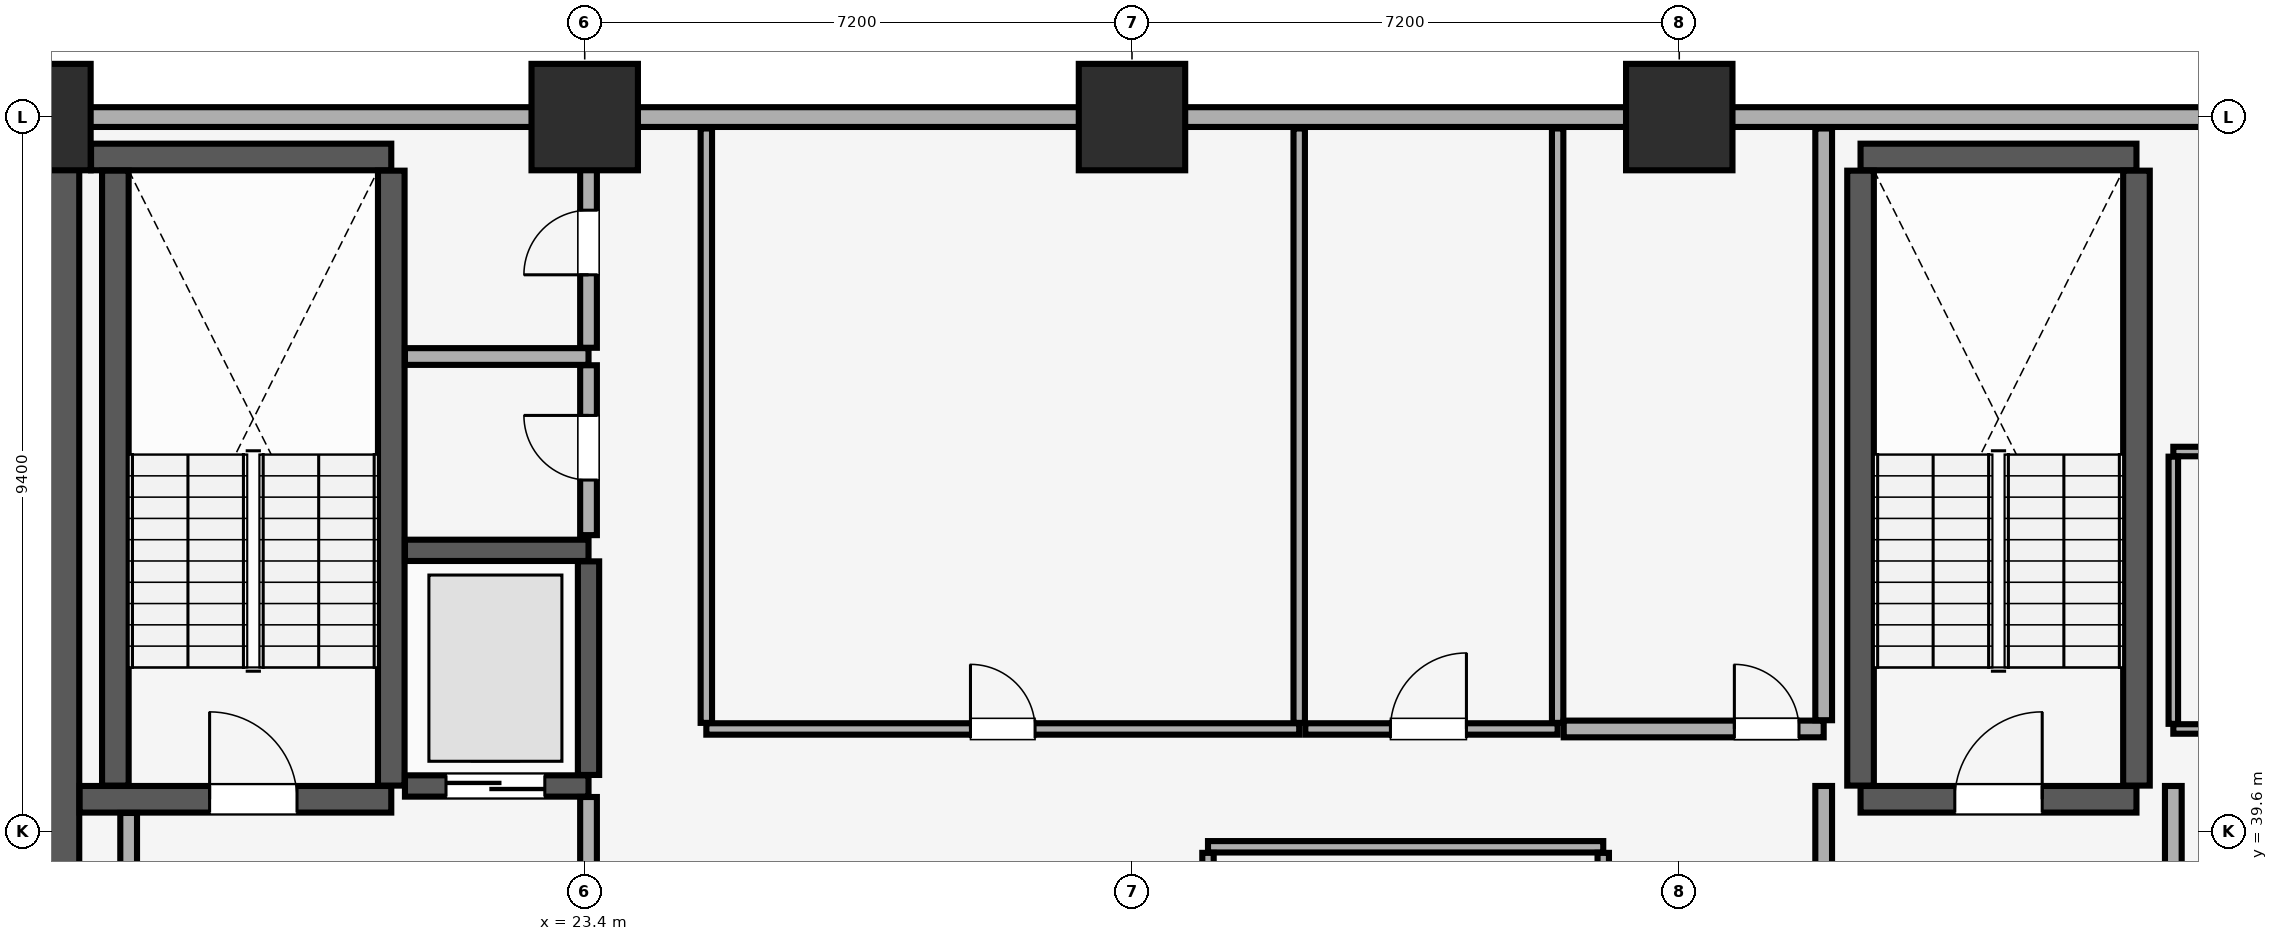
"""IFC4 building model, lengths in metres.
Left out: names, types, materials, properties, quantities, classifications, styles, units other than length and angle.
Written with IfcOpenShell. Run it as: python <this file> out.ifc"""

import sys

from ifc_helpers import new_model, si_unit, direction, frame, frame_2d, origin, origin_2d, place, context, subcontext, project, spatial, rectangle, extrude, element, fill, save


model = new_model("IFC4")
c1 = context("Model", 3, precision=1e-05, world=origin(), true_north=direction((0.0, 1.0)))
c2 = subcontext(c1, "Body", "Model", "MODEL_VIEW")
j1 = project(units=[si_unit("LENGTHUNIT", "METRE"), si_unit("PLANEANGLEUNIT", "RADIAN")], contexts=[c1])
p1 = place(None, origin())
s1 = spatial("IfcSite", under=j1, at=p1, CompositionType="ELEMENT")
p2 = place(p1, origin())
s2 = spatial("IfcBuilding", under=s1, at=p2, CompositionType="ELEMENT")
p3 = place(p2, frame((0.0, 0.0, 76.4)))
s3 = spatial("IfcBuildingStorey", under=s2, at=p3, CompositionType="ELEMENT", Elevation=76.4)
for number, where, z_axis, x_axis in (
    (1, (16.2, 49.0, 0.0), (0.0, 0.0, 1.0), (1.0, 0.0, 0.0)),
    (2, (23.4, 49.0, 0.0), (0.0, 0.0, 1.0), (1.0, 0.0, 0.0)),
    (3, (30.6, 49.0, 0.0), (0.0, 0.0, 1.0), (1.0, 0.0, 0.0)),
    (4, (37.8, 49.0, 0.0), (0.0, 0.0, 1.0), (1.0, 0.0, 0.0)),
):
    element("IfcColumn", number, at=place(p3, frame(where, z_axis=z_axis, x_axis=x_axis)), inside=s3, PredefinedType="COLUMN", context=c2, shape_type="SweptSolid", body=[
        extrude(rectangle(XDim=1.4, YDim=1.4, at=origin_2d()), origin(), (0.0, 0.0, 1.0), 3.4),
    ])
p4 = place(p3, frame((79.8, 49.0, 0.0), z_axis=(0.0, 0.0, 1.0), x_axis=(-1.0, 0.0, 0.0)))
e5 = element("IfcWall", 5, at=p4, inside=s3, PredefinedType="SOLIDWALL", context=c2, shape_type="SweptSolid", body=[
    extrude(rectangle(XDim=75.6, YDim=0.26, at=frame_2d((37.8, 0.0))), origin(), (0.0, 0.0, 1.0), 2.45),
])
p5 = place(p3, frame((16.2, 29.4, 0.0), z_axis=(0.0, 0.0, 1.0), x_axis=(0.0, 1.0, 0.0)))
e6 = element("IfcWall", 6, at=p5, inside=s3, PredefinedType="SHEAR", context=c2, shape_type="SweptSolid", body=[
    extrude(rectangle(XDim=19.2, YDim=1.1, at=frame_2d((9.6, 0.0))), origin(), (0.0, 0.0, 1.0), 3.4),
])
p6 = place(p3, frame((16.755, 40.025, 0.0), z_axis=(0.0, 0.0, 1.0), x_axis=(1.0, 0.0, 0.0)))
e7 = element("IfcWall", 7, at=p6, inside=s3, PredefinedType="SHEAR", context=c2, shape_type="SweptSolid", body=[
    extrude(rectangle(XDim=4.1, YDim=0.35, at=frame_2d((2.05, 0.0))), origin(), (0.0, 0.0, 1.0), 3.4),
])
p7 = place(p6, frame((1.71, 0.0, 0.0)))
e8 = element("IfcOpeningElement", 8, at=p7, cuts=e7, PredefinedType="OPENING", context=c2, shape_type="SweptSolid", body=[
    extrude(rectangle(XDim=1.15, YDim=2.15, at=frame_2d((0.575, 1.075))), frame((0.0, 0.185, 0.0), z_axis=(0.0, -1.0, 0.0), x_axis=(1.0, 0.0, 0.0)), (0.0, 0.0, 1.0), 0.37),
])
p8 = place(p3, frame((16.905, 48.475, 0.0), z_axis=(0.0, 0.0, 1.0), x_axis=(1.0, 0.0, 0.0)))
e9 = element("IfcWall", 9, at=p8, inside=s3, PredefinedType="SHEAR", context=c2, shape_type="SweptSolid", body=[
    extrude(rectangle(XDim=3.95, YDim=0.35, at=frame_2d((1.975, 0.0))), origin(), (0.0, 0.0, 1.0), 3.4),
])
for number, where, z_axis, x_axis in (
    (10, (17.225, 40.205, 0.0), (0.0, 0.0, 1.0), (0.0, 1.0, 0.0)),
    (11, (20.855, 40.205, 0.0), (0.0, 0.0, 1.0), (0.0, 1.0, 0.0)),
):
    element("IfcWall", number, at=place(p3, frame(where, z_axis=z_axis, x_axis=x_axis)), inside=s3, PredefinedType="SHEAR", context=c2, shape_type="SweptSolid", body=[
        extrude(rectangle(XDim=8.09, YDim=0.35, at=frame_2d((4.045, 0.0))), origin(), (0.0, 0.0, 1.0), 3.4),
    ])
p9 = place(p3, frame((40.185, 40.025, 0.0), z_axis=(0.0, 0.0, 1.0), x_axis=(1.0, 0.0, 0.0)))
e12 = element("IfcWall", 12, at=p9, inside=s3, PredefinedType="SHEAR", context=c2, shape_type="SweptSolid", body=[
    extrude(rectangle(XDim=3.63, YDim=0.35, at=frame_2d((1.815, 0.0))), origin(), (0.0, 0.0, 1.0), 3.4),
])
p10 = place(p9, frame((1.24, 0.0, 0.0)))
e13 = element("IfcOpeningElement", 13, at=p10, cuts=e12, PredefinedType="OPENING", context=c2, shape_type="SweptSolid", body=[
    extrude(rectangle(XDim=1.15, YDim=2.15, at=frame_2d((0.575, 1.075))), frame((0.0, 0.185, 0.0), z_axis=(0.0, -1.0, 0.0), x_axis=(1.0, 0.0, 0.0)), (0.0, 0.0, 1.0), 0.37),
])
p11 = place(p3, frame((40.185, 48.475, 0.0), z_axis=(0.0, 0.0, 1.0), x_axis=(1.0, 0.0, 0.0)))
e14 = element("IfcWall", 14, at=p11, inside=s3, PredefinedType="SHEAR", context=c2, shape_type="SweptSolid", body=[
    extrude(rectangle(XDim=3.63, YDim=0.35, at=frame_2d((1.815, 0.0))), origin(), (0.0, 0.0, 1.0), 3.4),
])
for number, where, z_axis, x_axis in (
    (15, (40.185, 40.205, 0.0), (0.0, 0.0, 1.0), (0.0, 1.0, 0.0)),
    (16, (43.815, 40.205, 0.0), (0.0, 0.0, 1.0), (0.0, 1.0, 0.0)),
):
    element("IfcWall", number, at=place(p3, frame(where, z_axis=z_axis, x_axis=x_axis)), inside=s3, PredefinedType="SHEAR", context=c2, shape_type="SweptSolid", body=[
        extrude(rectangle(XDim=8.09, YDim=0.35, at=frame_2d((4.045, 0.0))), origin(), (0.0, 0.0, 1.0), 3.4),
    ])
p12 = place(p3, frame((21.035, 40.2, 0.0), z_axis=(0.0, 0.0, 1.0), x_axis=(1.0, 0.0, 0.0)))
e17 = element("IfcWall", 17, at=p12, inside=s3, PredefinedType="SHEAR", context=c2, shape_type="SweptSolid", body=[
    extrude(rectangle(XDim=2.415, YDim=0.28, at=frame_2d((1.208, 0.0))), origin(), (0.0, 0.0, 1.0), 3.4),
])
p13 = place(p12, frame((0.54, 0.0, 0.0)))
e18 = element("IfcOpeningElement", 18, at=p13, cuts=e17, PredefinedType="OPENING", context=c2, shape_type="SweptSolid", body=[
    extrude(rectangle(XDim=1.3, YDim=2.3, at=frame_2d((0.65, 1.15))), frame((0.0, 0.15, 0.0), z_axis=(0.0, -1.0, 0.0), x_axis=(1.0, 0.0, 0.0)), (0.0, 0.0, 1.0), 0.3),
])
p14 = place(p3, frame((21.035, 43.3, 0.0), z_axis=(0.0, 0.0, 1.0), x_axis=(1.0, 0.0, 0.0)))
e19 = element("IfcWall", 19, at=p14, inside=s3, PredefinedType="SHEAR", context=c2, shape_type="SweptSolid", body=[
    extrude(rectangle(XDim=2.415, YDim=0.28, at=frame_2d((1.208, 0.0))), origin(), (0.0, 0.0, 1.0), 3.4),
])
p15 = place(p3, frame((23.45, 40.345, 0.0), z_axis=(0.0, 0.0, 1.0), x_axis=(0.0, 1.0, 0.0)))
e20 = element("IfcWall", 20, at=p15, inside=s3, PredefinedType="SHEAR", context=c2, shape_type="SweptSolid", body=[
    extrude(rectangle(XDim=2.81, YDim=0.28, at=frame_2d((1.405, 0.0))), origin(), (0.0, 0.0, 1.0), 3.4),
])
p16 = place(p3, frame((17.4, 34.415, 0.0), z_axis=(0.0, 0.0, 1.0), x_axis=(0.0, 1.0, 0.0)))
e21 = element("IfcWall", 21, at=p16, inside=s3, PredefinedType="PARTITIONING", context=c2, shape_type="SweptSolid", body=[
    extrude(rectangle(XDim=5.43, YDim=0.22, at=frame_2d((2.715, 0.0))), origin(), (0.0, 0.0, 1.0), 3.4),
])
p17 = place(p3, frame((23.45, 34.415, 0.0), z_axis=(0.0, 0.0, 1.0), x_axis=(0.0, 1.0, 0.0)))
e22 = element("IfcWall", 22, at=p17, inside=s3, PredefinedType="PARTITIONING", context=c2, shape_type="SweptSolid", body=[
    extrude(rectangle(XDim=5.64, YDim=0.22, at=frame_2d((2.82, 0.0))), origin(), (0.0, 0.0, 1.0), 3.4),
])
for number, where, z_axis, x_axis in (
    (23, (39.7, 34.415, 0.0), (0.0, 0.0, 1.0), (0.0, 1.0, 0.0)),
    (24, (44.3, 34.415, 0.0), (0.0, 0.0, 1.0), (0.0, 1.0, 0.0)),
):
    element("IfcWall", number, at=place(p3, frame(where, z_axis=z_axis, x_axis=x_axis)), inside=s3, PredefinedType="PARTITIONING", context=c2, shape_type="SweptSolid", body=[
        extrude(rectangle(XDim=5.785, YDim=0.22, at=frame_2d((2.893, 0.0))), origin(), (0.0, 0.0, 1.0), 3.4),
    ])
p18 = place(p3, frame((21.035, 45.85, 0.0), z_axis=(0.0, 0.0, 1.0), x_axis=(1.0, 0.0, 0.0)))
e25 = element("IfcWall", 25, at=p18, inside=s3, PredefinedType="PARTITIONING", context=c2, shape_type="SweptSolid", body=[
    extrude(rectangle(XDim=2.415, YDim=0.22, at=frame_2d((1.208, 0.0))), origin(), (0.0, 0.0, 1.0), 3.4),
])
p19 = place(p3, frame((23.45, 43.5, 0.0), z_axis=(0.0, 0.0, 1.0), x_axis=(0.0, 1.0, 0.0)))
e26 = element("IfcWall", 26, at=p19, inside=s3, PredefinedType="PARTITIONING", context=c2, shape_type="SweptSolid", body=[
    extrude(rectangle(XDim=2.235, YDim=0.22, at=frame_2d((1.118, 0.0))), origin(), (0.0, 0.0, 1.0), 3.4),
])
p20 = place(p19, frame((0.725, 0.0, 0.0)))
e27 = element("IfcOpeningElement", 27, at=p20, cuts=e26, PredefinedType="OPENING", context=c2, shape_type="SweptSolid", body=[
    extrude(rectangle(XDim=0.85, YDim=2.1, at=frame_2d((0.425, 1.05))), frame((0.0, 0.12, 0.0), z_axis=(0.0, -1.0, 0.0), x_axis=(1.0, 0.0, 0.0)), (0.0, 0.0, 1.0), 0.24),
])
p21 = place(p3, frame((23.45, 45.965, 0.0), z_axis=(0.0, 0.0, 1.0), x_axis=(0.0, 1.0, 0.0)))
e28 = element("IfcWall", 28, at=p21, inside=s3, PredefinedType="PARTITIONING", context=c2, shape_type="SweptSolid", body=[
    extrude(rectangle(XDim=2.885, YDim=0.22, at=frame_2d((1.442, 0.0))), origin(), (0.0, 0.0, 1.0), 3.4),
])
p22 = place(p21, frame((0.96, 0.0, 0.0)))
e29 = element("IfcOpeningElement", 29, at=p22, cuts=e28, PredefinedType="OPENING", context=c2, shape_type="SweptSolid", body=[
    extrude(rectangle(XDim=0.85, YDim=2.1, at=frame_2d((0.425, 1.05))), frame((0.0, 0.12, 0.0), z_axis=(0.0, -1.0, 0.0), x_axis=(1.0, 0.0, 0.0)), (0.0, 0.0, 1.0), 0.24),
])
p23 = place(p3, frame((31.6, 39.4, 0.0), z_axis=(0.0, 0.0, 1.0), x_axis=(1.0, 0.0, 0.0)))
e30 = element("IfcWall", 30, at=p23, inside=s3, PredefinedType="PARTITIONING", context=c2, shape_type="SweptSolid", body=[
    extrude(rectangle(XDim=5.2, YDim=0.15, at=frame_2d((2.6, 0.0))), origin(), (0.0, 0.0, 1.0), 3.4),
])
for number, where, z_axis, x_axis in (
    (31, (31.6, 34.38, 0.0), (0.0, 0.0, 1.0), (0.0, 1.0, 0.0)),
    (32, (36.8, 34.38, 0.0), (0.0, 0.0, 1.0), (0.0, 1.0, 0.0)),
):
    element("IfcWall", number, at=place(p3, frame(where, z_axis=z_axis, x_axis=x_axis)), inside=s3, PredefinedType="PARTITIONING", context=c2, shape_type="SweptSolid", body=[
        extrude(rectangle(XDim=4.94, YDim=0.15, at=frame_2d((2.47, 0.0))), origin(), (0.0, 0.0, 1.0), 3.4),
    ])
p24 = place(p3, frame((25.0, 40.95, 0.0), z_axis=(0.0, 0.0, 1.0), x_axis=(1.0, 0.0, 0.0)))
e33 = element("IfcWall", 33, at=p24, inside=s3, PredefinedType="PARTITIONING", context=c2, shape_type="SweptSolid", body=[
    extrude(rectangle(XDim=7.8, YDim=0.15, at=frame_2d((3.9, 0.0))), origin(), (0.0, 0.0, 1.0), 3.4),
])
p25 = place(p24, frame((3.475, 0.0, 0.0)))
e34 = element("IfcOpeningElement", 34, at=p25, cuts=e33, PredefinedType="OPENING", context=c2, shape_type="SweptSolid", body=[
    extrude(rectangle(XDim=0.85, YDim=2.1, at=frame_2d((0.425, 1.05))), frame((0.0, 0.085, 0.0), z_axis=(0.0, -1.0, 0.0), x_axis=(1.0, 0.0, 0.0)), (0.0, 0.0, 1.0), 0.17),
])
for number, where, z_axis, x_axis in (
    (35, (25.0, 41.03, 0.0), (0.0, 0.0, 1.0), (0.0, 1.0, 0.0)),
    (36, (32.8, 41.03, 0.0), (0.0, 0.0, 1.0), (0.0, 1.0, 0.0)),
):
    element("IfcWall", number, at=place(p3, frame(where, z_axis=z_axis, x_axis=x_axis)), inside=s3, PredefinedType="PARTITIONING", context=c2, shape_type="SweptSolid", body=[
        extrude(rectangle(XDim=7.82, YDim=0.15, at=frame_2d((3.91, 0.0))), origin(), (0.0, 0.0, 1.0), 3.4),
    ])
p26 = place(p3, frame((32.88, 40.95, 0.0), z_axis=(0.0, 0.0, 1.0), x_axis=(1.0, 0.0, 0.0)))
e37 = element("IfcWall", 37, at=p26, inside=s3, PredefinedType="PARTITIONING", context=c2, shape_type="SweptSolid", body=[
    extrude(rectangle(XDim=3.32, YDim=0.15, at=frame_2d((1.66, 0.0))), origin(), (0.0, 0.0, 1.0), 3.4),
])
p27 = place(p26, frame((1.12, 0.0, 0.0)))
e38 = element("IfcOpeningElement", 38, at=p27, cuts=e37, PredefinedType="OPENING", context=c2, shape_type="SweptSolid", body=[
    extrude(rectangle(XDim=1.0, YDim=2.15, at=frame_2d((0.5, 1.075))), frame((0.0, 0.085, 0.0), z_axis=(0.0, -1.0, 0.0), x_axis=(1.0, 0.0, 0.0)), (0.0, 0.0, 1.0), 0.17),
])
p28 = place(p3, frame((36.2, 41.03, 0.0), z_axis=(0.0, 0.0, 1.0), x_axis=(0.0, 1.0, 0.0)))
e39 = element("IfcWall", 39, at=p28, inside=s3, PredefinedType="PARTITIONING", context=c2, shape_type="SweptSolid", body=[
    extrude(rectangle(XDim=7.82, YDim=0.15, at=frame_2d((3.91, 0.0))), origin(), (0.0, 0.0, 1.0), 3.4),
])
p29 = place(p3, frame((36.28, 40.95, 0.0), z_axis=(0.0, 0.0, 1.0), x_axis=(1.0, 0.0, 0.0)))
e40 = element("IfcWall", 40, at=p29, inside=s3, PredefinedType="PARTITIONING", context=c2, shape_type="SweptSolid", body=[
    extrude(rectangle(XDim=3.42, YDim=0.22, at=frame_2d((1.71, 0.0))), origin(), (0.0, 0.0, 1.0), 3.4),
])
p30 = place(p29, frame((2.245, 0.0, 0.0)))
e41 = element("IfcOpeningElement", 41, at=p30, cuts=e40, PredefinedType="OPENING", context=c2, shape_type="SweptSolid", body=[
    extrude(rectangle(XDim=0.85, YDim=2.1, at=frame_2d((0.425, 1.05))), frame((0.0, 0.12, 0.0), z_axis=(0.0, -1.0, 0.0), x_axis=(1.0, 0.0, 0.0)), (0.0, 0.0, 1.0), 0.24),
])
p31 = place(p3, frame((39.7, 41.065, 0.0), z_axis=(0.0, 0.0, 1.0), x_axis=(0.0, 1.0, 0.0)))
e42 = element("IfcWall", 42, at=p31, inside=s3, PredefinedType="PARTITIONING", context=c2, shape_type="SweptSolid", body=[
    extrude(rectangle(XDim=7.785, YDim=0.22, at=frame_2d((3.893, 0.0))), origin(), (0.0, 0.0, 1.0), 3.4),
])
p32 = place(p3, frame((44.3, 40.95, 0.0), z_axis=(0.0, 0.0, 1.0), x_axis=(1.0, 0.0, 0.0)))
e43 = element("IfcWall", 43, at=p32, inside=s3, PredefinedType="PARTITIONING", context=c2, shape_type="SweptSolid", body=[
    extrude(rectangle(XDim=4.6, YDim=0.125, at=frame_2d((2.3, 0.0))), origin(), (0.0, 0.0, 1.0), 3.4),
])
p33 = place(p32, frame((2.85, 0.0, 0.0)))
e44 = element("IfcOpeningElement", 44, at=p33, cuts=e43, PredefinedType="OPENING", context=c2, shape_type="SweptSolid", body=[
    extrude(rectangle(XDim=0.9, YDim=2.1, at=frame_2d((0.45, 1.05))), frame((0.0, 0.073, 0.0), z_axis=(0.0, -1.0, 0.0), x_axis=(1.0, 0.0, 0.0)), (0.0, 0.0, 1.0), 0.145),
])
p34 = place(p3, frame((44.3, 44.6, 0.0), z_axis=(0.0, 0.0, 1.0), x_axis=(1.0, 0.0, 0.0)))
e45 = element("IfcWall", 45, at=p34, inside=s3, PredefinedType="PARTITIONING", context=c2, shape_type="SweptSolid", body=[
    extrude(rectangle(XDim=4.6, YDim=0.125, at=frame_2d((2.3, 0.0))), origin(), (0.0, 0.0, 1.0), 3.4),
])
p35 = place(p3, frame((44.3, 41.018, 0.0), z_axis=(0.0, 0.0, 1.0), x_axis=(0.0, 1.0, 0.0)))
e46 = element("IfcWall", 46, at=p35, inside=s3, PredefinedType="PARTITIONING", context=c2, shape_type="SweptSolid", body=[
    extrude(rectangle(XDim=3.515, YDim=0.125, at=frame_2d((1.757, 0.0))), origin(), (0.0, 0.0, 1.0), 3.4),
])
p36 = place(p7, origin())
e47 = element("IfcDoor", 47, at=p36, inside=s3, OperationType="SINGLE_SWING_LEFT", PredefinedType="DOOR", context=c2, shape_type="SweptSolid", body=[
    extrude(rectangle(XDim=1.15, YDim=2.15, at=frame_2d((0.575, 1.075))), frame((0.0, 0.025, 0.0), z_axis=(0.0, -1.0, 0.0), x_axis=(1.0, 0.0, 0.0)), (0.0, 0.0, 1.0), 0.05),
])
fill(e8, e47)
p37 = place(p10, origin())
e48 = element("IfcDoor", 48, at=p37, inside=s3, OperationType="SINGLE_SWING_RIGHT", PredefinedType="DOOR", context=c2, shape_type="SweptSolid", body=[
    extrude(rectangle(XDim=1.15, YDim=2.15, at=frame_2d((0.575, 1.075))), frame((0.0, 0.025, 0.0), z_axis=(0.0, -1.0, 0.0), x_axis=(1.0, 0.0, 0.0)), (0.0, 0.0, 1.0), 0.05),
])
fill(e13, e48)
p38 = place(p13, origin())
e49 = element("IfcDoor", 49, at=p38, inside=s3, OperationType="DOUBLE_DOOR_SLIDING", PredefinedType="DOOR", context=c2, shape_type="SweptSolid", body=[
    extrude(rectangle(XDim=1.3, YDim=2.3, at=frame_2d((0.65, 1.15))), frame((0.0, 0.025, 0.0), z_axis=(0.0, -1.0, 0.0), x_axis=(1.0, 0.0, 0.0)), (0.0, 0.0, 1.0), 0.05),
])
fill(e18, e49)
p39 = place(p20, origin())
e50 = element("IfcDoor", 50, at=p39, inside=s3, OperationType="SINGLE_SWING_RIGHT", PredefinedType="DOOR", context=c2, shape_type="SweptSolid", body=[
    extrude(rectangle(XDim=0.85, YDim=2.1, at=frame_2d((0.425, 1.05))), frame((0.0, 0.025, 0.0), z_axis=(0.0, -1.0, 0.0), x_axis=(1.0, 0.0, 0.0)), (0.0, 0.0, 1.0), 0.05),
])
fill(e27, e50)
p40 = place(p22, origin())
e51 = element("IfcDoor", 51, at=p40, inside=s3, OperationType="SINGLE_SWING_LEFT", PredefinedType="DOOR", context=c2, shape_type="SweptSolid", body=[
    extrude(rectangle(XDim=0.85, YDim=2.1, at=frame_2d((0.425, 1.05))), frame((0.0, 0.025, 0.0), z_axis=(0.0, -1.0, 0.0), x_axis=(1.0, 0.0, 0.0)), (0.0, 0.0, 1.0), 0.05),
])
fill(e29, e51)
p41 = place(p25, origin())
e52 = element("IfcDoor", 52, at=p41, inside=s3, OperationType="SINGLE_SWING_LEFT", PredefinedType="DOOR", context=c2, shape_type="SweptSolid", body=[
    extrude(rectangle(XDim=0.85, YDim=2.1, at=frame_2d((0.425, 1.05))), frame((0.0, 0.025, 0.0), z_axis=(0.0, -1.0, 0.0), x_axis=(1.0, 0.0, 0.0)), (0.0, 0.0, 1.0), 0.05),
])
fill(e34, e52)
p42 = place(p27, origin())
e53 = element("IfcDoor", 53, at=p42, inside=s3, OperationType="SINGLE_SWING_RIGHT", PredefinedType="DOOR", context=c2, shape_type="SweptSolid", body=[
    extrude(rectangle(XDim=1.0, YDim=2.15, at=frame_2d((0.5, 1.075))), frame((0.0, 0.025, 0.0), z_axis=(0.0, -1.0, 0.0), x_axis=(1.0, 0.0, 0.0)), (0.0, 0.0, 1.0), 0.05),
])
fill(e38, e53)
p43 = place(p30, origin())
e54 = element("IfcDoor", 54, at=p43, inside=s3, OperationType="SINGLE_SWING_LEFT", PredefinedType="DOOR", context=c2, shape_type="SweptSolid", body=[
    extrude(rectangle(XDim=0.85, YDim=2.1, at=frame_2d((0.425, 1.05))), frame((0.0, 0.025, 0.0), z_axis=(0.0, -1.0, 0.0), x_axis=(1.0, 0.0, 0.0)), (0.0, 0.0, 1.0), 0.05),
])
fill(e41, e54)
save(model, sys.argv[1])
